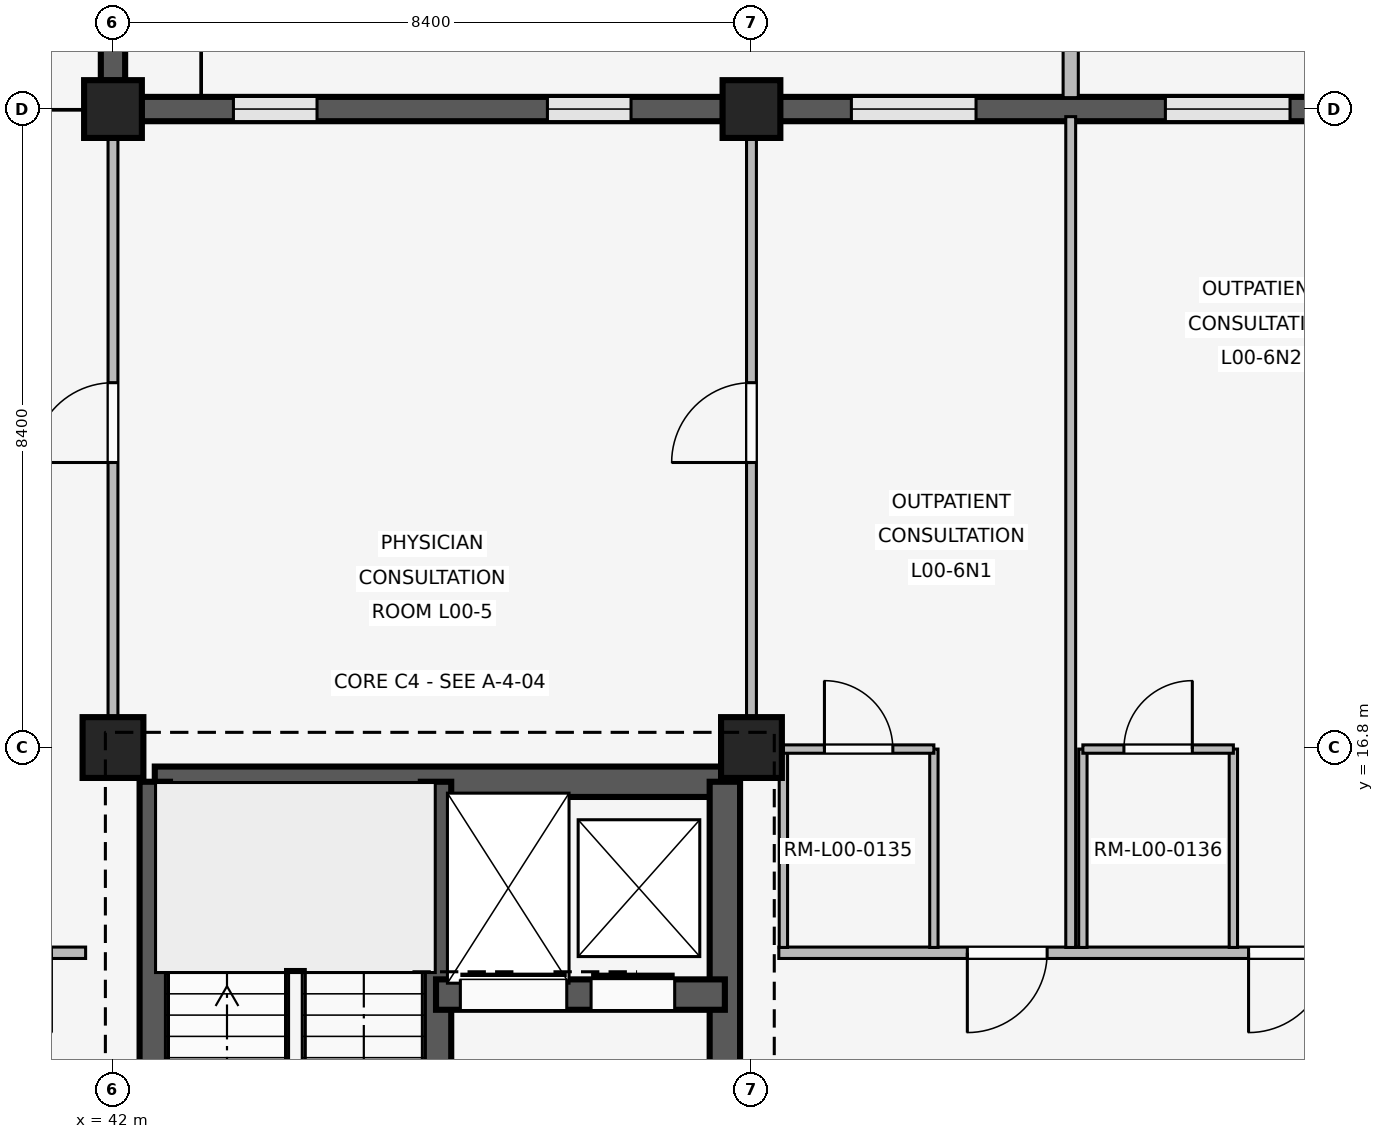
"""IFC4 building model, lengths in metres.
Left out: names, types, materials, properties, quantities, classifications, styles, units other than length and angle.
Written with IfcOpenShell. Run it as: python <this file> out.ifc"""

import sys

from ifc_helpers import new_model, si_unit, direction, frame, frame_2d, origin, origin_2d, place, context, subcontext, project, spatial, rectangle, extrude, element, fill, save


model = new_model("IFC4")
c1 = context("Model", 3, precision=1e-05, world=origin(), true_north=direction((0.0, 1.0)))
c2 = subcontext(c1, "Body", "Model", "MODEL_VIEW")
j1 = project(units=[si_unit("LENGTHUNIT", "METRE"), si_unit("PLANEANGLEUNIT", "RADIAN")], contexts=[c1])
p1 = place(None, origin())
s1 = spatial("IfcSite", under=j1, at=p1, CompositionType="ELEMENT")
p2 = place(p1, origin())
s2 = spatial("IfcBuilding", under=s1, at=p2, CompositionType="ELEMENT")
p3 = place(p2, origin())
s3 = spatial("IfcBuildingStorey", under=s2, at=p3, CompositionType="ELEMENT", Elevation=0.0)
p4 = place(p3, frame((42.0, 16.8, 0.0), z_axis=(0.0, 0.0, 1.0), x_axis=(1.0, 0.0, 0.0)))
e1 = element("IfcColumn", 1, at=p4, inside=s3, PredefinedType="COLUMN", context=c2, shape_type="SweptSolid", body=[
    extrude(rectangle(XDim=0.8, YDim=0.8, at=origin_2d()), origin(), (0.0, 0.0, 1.0), 4.8),
])
p5 = place(p3, frame((42.0, 25.2, 0.0), z_axis=(0.0, 0.0, 1.0), x_axis=(1.0, 0.0, 0.0)))
e2 = element("IfcColumn", 2, at=p5, inside=s3, PredefinedType="COLUMN", context=c2, shape_type="SweptSolid", body=[
    extrude(rectangle(XDim=0.76, YDim=0.76, at=origin_2d()), origin(), (0.0, 0.0, 1.0), 4.8),
])
p6 = place(p3, frame((50.4, 16.8, 0.0), z_axis=(0.0, 0.0, 1.0), x_axis=(1.0, 0.0, 0.0)))
e3 = element("IfcColumn", 3, at=p6, inside=s3, PredefinedType="COLUMN", context=c2, shape_type="SweptSolid", body=[
    extrude(rectangle(XDim=0.8, YDim=0.8, at=origin_2d()), origin(), (0.0, 0.0, 1.0), 4.8),
])
p7 = place(p3, frame((50.4, 25.2, 0.0), z_axis=(0.0, 0.0, 1.0), x_axis=(1.0, 0.0, 0.0)))
e4 = element("IfcColumn", 4, at=p7, inside=s3, PredefinedType="COLUMN", context=c2, shape_type="SweptSolid", body=[
    extrude(rectangle(XDim=0.76, YDim=0.76, at=origin_2d()), origin(), (0.0, 0.0, 1.0), 4.8),
])
p8 = place(p3, frame((42.0, 33.225, 0.0), z_axis=(0.0, 0.0, 1.0), x_axis=(0.0, -1.0, 0.0)))
e5 = element("IfcWall", 5, at=p8, inside=s3, PredefinedType="SOLIDWALL", context=c2, shape_type="SweptSolid", body=[
    extrude(rectangle(XDim=7.65, YDim=0.32, at=frame_2d((3.825, 0.0))), origin(), (0.0, 0.0, 1.0), 3.82),
])
p9 = place(p8, frame((0.969, 0.0, 0.85)))
e6 = element("IfcOpeningElement", 6, at=p9, cuts=e5, PredefinedType="OPENING", context=c2, shape_type="SweptSolid", body=[
    extrude(rectangle(XDim=1.58, YDim=1.7, at=frame_2d((0.79, 0.85))), frame((0.0, 0.17, 0.0), z_axis=(0.0, -1.0, 0.0), x_axis=(1.0, 0.0, 0.0)), (0.0, 0.0, 1.0), 0.34),
])
p10 = place(p8, frame((5.101, 0.0, 0.85)))
e7 = element("IfcOpeningElement", 7, at=p10, cuts=e5, PredefinedType="OPENING", context=c2, shape_type="SweptSolid", body=[
    extrude(rectangle(XDim=1.58, YDim=1.7, at=frame_2d((0.79, 0.85))), frame((0.0, 0.17, 0.0), z_axis=(0.0, -1.0, 0.0), x_axis=(1.0, 0.0, 0.0)), (0.0, 0.0, 1.0), 0.34),
])
p11 = place(p3, frame((42.375, 25.2, 0.0), z_axis=(0.0, 0.0, 1.0), x_axis=(1.0, 0.0, 0.0)))
e8 = element("IfcWall", 8, at=p11, inside=s3, PredefinedType="SOLIDWALL", context=c2, shape_type="SweptSolid", body=[
    extrude(rectangle(XDim=7.65, YDim=0.32, at=frame_2d((3.825, 0.0))), origin(), (0.0, 0.0, 1.0), 3.82),
])
p12 = place(p11, frame((1.209, 0.0, 0.85)))
e9 = element("IfcOpeningElement", 9, at=p12, cuts=e8, PredefinedType="OPENING", context=c2, shape_type="SweptSolid", body=[
    extrude(rectangle(XDim=1.1, YDim=1.6, at=frame_2d((0.55, 0.8))), frame((0.0, 0.17, 0.0), z_axis=(0.0, -1.0, 0.0), x_axis=(1.0, 0.0, 0.0)), (0.0, 0.0, 1.0), 0.34),
])
p13 = place(p11, frame((5.341, 0.0, 0.85)))
e10 = element("IfcOpeningElement", 10, at=p13, cuts=e8, PredefinedType="OPENING", context=c2, shape_type="SweptSolid", body=[
    extrude(rectangle(XDim=1.1, YDim=1.6, at=frame_2d((0.55, 0.8))), frame((0.0, 0.17, 0.0), z_axis=(0.0, -1.0, 0.0), x_axis=(1.0, 0.0, 0.0)), (0.0, 0.0, 1.0), 0.34),
])
p14 = place(p3, frame((50.775, 25.2, 0.0), z_axis=(0.0, 0.0, 1.0), x_axis=(1.0, 0.0, 0.0)))
e11 = element("IfcWall", 11, at=p14, inside=s3, PredefinedType="SOLIDWALL", context=c2, shape_type="SweptSolid", body=[
    extrude(rectangle(XDim=7.65, YDim=0.32, at=frame_2d((3.825, 0.0))), origin(), (0.0, 0.0, 1.0), 3.82),
])
p15 = place(p14, frame((0.939, 0.0, 0.85)))
e12 = element("IfcOpeningElement", 12, at=p15, cuts=e11, PredefinedType="OPENING", context=c2, shape_type="SweptSolid", body=[
    extrude(rectangle(XDim=1.64, YDim=1.75, at=frame_2d((0.82, 0.875))), frame((0.0, 0.17, 0.0), z_axis=(0.0, -1.0, 0.0), x_axis=(1.0, 0.0, 0.0)), (0.0, 0.0, 1.0), 0.34),
])
p16 = place(p14, frame((5.071, 0.0, 0.85)))
e13 = element("IfcOpeningElement", 13, at=p16, cuts=e11, PredefinedType="OPENING", context=c2, shape_type="SweptSolid", body=[
    extrude(rectangle(XDim=1.64, YDim=1.75, at=frame_2d((0.82, 0.875))), frame((0.0, 0.17, 0.0), z_axis=(0.0, -1.0, 0.0), x_axis=(1.0, 0.0, 0.0)), (0.0, 0.0, 1.0), 0.34),
])
p17 = place(p3, frame((54.6, 25.35, 0.0), z_axis=(0.0, 0.0, 1.0), x_axis=(0.0, 1.0, 0.0)))
e14 = element("IfcWall", 14, at=p17, inside=s3, PredefinedType="ELEMENTEDWALL", context=c2, shape_type="SweptSolid", body=[
    extrude(rectangle(XDim=0.85, YDim=0.2, at=frame_2d((0.425, 0.0))), origin(), (0.0, 0.0, 1.0), 3.8),
])
p18 = place(p3, frame((42.55, 16.35, 0.0), z_axis=(0.0, 0.0, 1.0), x_axis=(1.0, 0.0, 0.0)))
e15 = element("IfcWall", 15, at=p18, inside=s3, PredefinedType="SHEAR", context=c2, shape_type="SweptSolid", body=[
    extrude(rectangle(XDim=7.5, YDim=0.4, at=frame_2d((3.75, 0.0))), origin(), (0.0, 0.0, 1.0), 4.52),
])
p19 = place(p3, frame((42.55, 8.8, 0.0), z_axis=(0.0, 0.0, 1.0), x_axis=(0.0, 1.0, 0.0)))
e16 = element("IfcWall", 16, at=p19, inside=s3, PredefinedType="SHEAR", context=c2, shape_type="SweptSolid", body=[
    extrude(rectangle(XDim=7.55, YDim=0.4, at=frame_2d((3.775, 0.0))), origin(), (0.0, 0.0, 1.0), 4.52),
])
p20 = place(p19, frame((0.28, 0.0, 0.0)))
e17 = element("IfcOpeningElement", 17, at=p20, cuts=e16, PredefinedType="OPENING", context=c2, shape_type="SweptSolid", body=[
    extrude(rectangle(XDim=1.0, YDim=2.15, at=frame_2d((0.5, 1.075))), frame((0.0, 0.21, 0.0), z_axis=(0.0, -1.0, 0.0), x_axis=(1.0, 0.0, 0.0)), (0.0, 0.0, 1.0), 0.42),
])
p21 = place(p3, frame((50.05, 8.8, 0.0), z_axis=(0.0, 0.0, 1.0), x_axis=(0.0, 1.0, 0.0)))
e18 = element("IfcWall", 18, at=p21, inside=s3, PredefinedType="SHEAR", context=c2, shape_type="SweptSolid", body=[
    extrude(rectangle(XDim=7.55, YDim=0.4, at=frame_2d((3.775, 0.0))), origin(), (0.0, 0.0, 1.0), 4.52),
])
p22 = place(p21, frame((2.4, 0.0, 0.0)))
e19 = element("IfcOpeningElement", 19, at=p22, cuts=e18, PredefinedType="OPENING", context=c2, shape_type="SweptSolid", body=[
    extrude(rectangle(XDim=1.2, YDim=2.2, at=frame_2d((0.6, 1.1))), frame((0.0, 0.21, 0.0), z_axis=(0.0, -1.0, 0.0), x_axis=(1.0, 0.0, 0.0)), (0.0, 0.0, 1.0), 0.42),
])
p23 = place(p3, frame((46.25, 8.8, 0.0), z_axis=(0.0, 0.0, 1.0), x_axis=(0.0, 1.0, 0.0)))
e20 = element("IfcWall", 20, at=p23, inside=s3, PredefinedType="SHEAR", context=c2, shape_type="SweptSolid", body=[
    extrude(rectangle(XDim=7.55, YDim=0.4, at=frame_2d((3.775, 0.0))), origin(), (0.0, 0.0, 1.0), 4.52),
])
p24 = place(p23, frame((0.28, 0.0, 0.0)))
e21 = element("IfcOpeningElement", 21, at=p24, cuts=e20, PredefinedType="OPENING", context=c2, shape_type="SweptSolid", body=[
    extrude(rectangle(XDim=1.0, YDim=2.15, at=frame_2d((0.5, 1.075))), frame((0.0, 0.21, 0.0), z_axis=(0.0, -1.0, 0.0), x_axis=(1.0, 0.0, 0.0)), (0.0, 0.0, 1.0), 0.42),
])
p25 = place(p3, frame((46.25, 13.55, 0.0), z_axis=(0.0, 0.0, 1.0), x_axis=(1.0, 0.0, 0.0)))
e22 = element("IfcWall", 22, at=p25, inside=s3, PredefinedType="SHEAR", context=c2, shape_type="SweptSolid", body=[
    extrude(rectangle(XDim=3.8, YDim=0.4, at=frame_2d((1.9, 0.0))), origin(), (0.0, 0.0, 1.0), 4.52),
])
p26 = place(p25, frame((0.32, 0.0, 0.0)))
e23 = element("IfcOpeningElement", 23, at=p26, cuts=e22, PredefinedType="OPENING", context=c2, shape_type="SweptSolid", body=[
    extrude(rectangle(XDim=1.4, YDim=2.25, at=frame_2d((0.7, 1.125))), frame((0.0, 0.21, 0.0), z_axis=(0.0, -1.0, 0.0), x_axis=(1.0, 0.0, 0.0)), (0.0, 0.0, 1.0), 0.42),
])
p27 = place(p25, frame((2.04, 0.0, 0.0)))
e24 = element("IfcOpeningElement", 24, at=p27, cuts=e22, PredefinedType="OPENING", context=c2, shape_type="SweptSolid", body=[
    extrude(rectangle(XDim=1.1, YDim=2.15, at=frame_2d((0.55, 1.075))), frame((0.0, 0.21, 0.0), z_axis=(0.0, -1.0, 0.0), x_axis=(1.0, 0.0, 0.0)), (0.0, 0.0, 1.0), 0.42),
])
p28 = place(p3, frame((41.64, 14.1, 0.0), z_axis=(0.0, 0.0, 1.0), x_axis=(-1.0, 0.0, 0.0)))
e25 = element("IfcWall", 25, at=p28, inside=s3, PredefinedType="PARTITIONING", context=c2, shape_type="SweptSolid", body=[
    extrude(rectangle(XDim=7.96, YDim=0.15, at=frame_2d((3.98, 0.0))), origin(), (0.0, 0.0, 1.0), 3.8),
])
p29 = place(p28, frame((0.45, 0.0, 0.0)))
e26 = element("IfcOpeningElement", 26, at=p29, cuts=e25, PredefinedType="OPENING", context=c2, shape_type="SweptSolid", body=[
    extrude(rectangle(XDim=1.05, YDim=2.2, at=frame_2d((0.525, 1.1))), frame((0.0, 0.085, 0.0), z_axis=(0.0, -1.0, 0.0), x_axis=(1.0, 0.0, 0.0)), (0.0, 0.0, 1.0), 0.17),
])
p30 = place(p28, frame((4.15, 0.0, 0.0)))
e27 = element("IfcOpeningElement", 27, at=p30, cuts=e25, PredefinedType="OPENING", context=c2, shape_type="SweptSolid", body=[
    extrude(rectangle(XDim=1.05, YDim=2.2, at=frame_2d((0.525, 1.1))), frame((0.0, 0.085, 0.0), z_axis=(0.0, -1.0, 0.0), x_axis=(1.0, 0.0, 0.0)), (0.0, 0.0, 1.0), 0.17),
])
p31 = place(p3, frame((42.0, 17.15, 0.0), z_axis=(0.0, 0.0, 1.0), x_axis=(0.0, 1.0, 0.0)))
e28 = element("IfcWall", 28, at=p31, inside=s3, PredefinedType="PARTITIONING", context=c2, shape_type="SweptSolid", body=[
    extrude(rectangle(XDim=7.91, YDim=0.13, at=frame_2d((3.955, 0.0))), origin(), (0.0, 0.0, 1.0), 3.8),
])
p32 = place(p31, frame((3.4, 0.0, 0.0)))
e29 = element("IfcOpeningElement", 29, at=p32, cuts=e28, PredefinedType="OPENING", context=c2, shape_type="SweptSolid", body=[
    extrude(rectangle(XDim=1.05, YDim=2.2, at=frame_2d((0.525, 1.1))), frame((0.0, 0.075, 0.0), z_axis=(0.0, -1.0, 0.0), x_axis=(1.0, 0.0, 0.0)), (0.0, 0.0, 1.0), 0.15),
])
p33 = place(p3, frame((50.4, 17.15, 0.0), z_axis=(0.0, 0.0, 1.0), x_axis=(0.0, 1.0, 0.0)))
e30 = element("IfcWall", 30, at=p33, inside=s3, PredefinedType="PARTITIONING", context=c2, shape_type="SweptSolid", body=[
    extrude(rectangle(XDim=7.91, YDim=0.13, at=frame_2d((3.955, 0.0))), origin(), (0.0, 0.0, 1.0), 3.8),
])
p34 = place(p33, frame((3.4, 0.0, 0.0)))
e31 = element("IfcOpeningElement", 31, at=p34, cuts=e30, PredefinedType="OPENING", context=c2, shape_type="SweptSolid", body=[
    extrude(rectangle(XDim=1.05, YDim=2.2, at=frame_2d((0.525, 1.1))), frame((0.0, 0.075, 0.0), z_axis=(0.0, -1.0, 0.0), x_axis=(1.0, 0.0, 0.0)), (0.0, 0.0, 1.0), 0.15),
])
p35 = place(p3, frame((58.72, 14.1, 0.0), z_axis=(0.0, 0.0, 1.0), x_axis=(-1.0, 0.0, 0.0)))
e32 = element("IfcWall", 32, at=p35, inside=s3, PredefinedType="PARTITIONING", context=c2, shape_type="SweptSolid", body=[
    extrude(rectangle(XDim=7.96, YDim=0.15, at=frame_2d((3.98, 0.0))), origin(), (0.0, 0.0, 1.0), 3.8),
])
p36 = place(p35, frame((0.73, 0.0, 0.0)))
e33 = element("IfcOpeningElement", 33, at=p36, cuts=e32, PredefinedType="OPENING", context=c2, shape_type="SweptSolid", body=[
    extrude(rectangle(XDim=1.05, YDim=2.2, at=frame_2d((0.525, 1.1))), frame((0.0, 0.085, 0.0), z_axis=(0.0, -1.0, 0.0), x_axis=(1.0, 0.0, 0.0)), (0.0, 0.0, 1.0), 0.17),
])
p37 = place(p35, frame((4.43, 0.0, 0.0)))
e34 = element("IfcOpeningElement", 34, at=p37, cuts=e32, PredefinedType="OPENING", context=c2, shape_type="SweptSolid", body=[
    extrude(rectangle(XDim=1.05, YDim=2.2, at=frame_2d((0.525, 1.1))), frame((0.0, 0.085, 0.0), z_axis=(0.0, -1.0, 0.0), x_axis=(1.0, 0.0, 0.0)), (0.0, 0.0, 1.0), 0.17),
])
p38 = place(p3, frame((54.6, 14.17, 0.0), z_axis=(0.0, 0.0, 1.0), x_axis=(0.0, 1.0, 0.0)))
e35 = element("IfcWall", 35, at=p38, inside=s3, PredefinedType="PARTITIONING", context=c2, shape_type="SweptSolid", body=[
    extrude(rectangle(XDim=10.93, YDim=0.13, at=frame_2d((5.465, 0.0))), origin(), (0.0, 0.0, 1.0), 3.8),
])
for number, where, z_axis, x_axis in (
    (36, (50.82, 14.17, 0.0), (0.0, 0.0, 1.0), (0.0, 1.0, 0.0)),
    (37, (52.8, 14.17, 0.0), (0.0, 0.0, 1.0), (0.0, 1.0, 0.0)),
):
    element("IfcWall", number, at=place(p3, frame(where, z_axis=z_axis, x_axis=x_axis)), inside=s3, PredefinedType="PARTITIONING", context=c2, shape_type="SweptSolid", body=[
        extrude(rectangle(XDim=2.61, YDim=0.11, at=frame_2d((1.305, 0.0))), origin(), (0.0, 0.0, 1.0), 3.8),
    ])
p39 = place(p3, frame((50.82, 16.78, 0.0), z_axis=(0.0, 0.0, 1.0), x_axis=(1.0, 0.0, 0.0)))
e38 = element("IfcWall", 38, at=p39, inside=s3, PredefinedType="PARTITIONING", context=c2, shape_type="SweptSolid", body=[
    extrude(rectangle(XDim=1.98, YDim=0.11, at=frame_2d((0.99, 0.0))), origin(), (0.0, 0.0, 1.0), 3.8),
])
p40 = place(p39, frame((0.54, 0.0, 0.0)))
e39 = element("IfcOpeningElement", 39, at=p40, cuts=e38, PredefinedType="OPENING", context=c2, shape_type="SweptSolid", body=[
    extrude(rectangle(XDim=0.9, YDim=2.1, at=frame_2d((0.45, 1.05))), frame((0.0, 0.065, 0.0), z_axis=(0.0, -1.0, 0.0), x_axis=(1.0, 0.0, 0.0)), (0.0, 0.0, 1.0), 0.13),
])
for number, where, z_axis, x_axis in (
    (40, (54.76, 14.17, 0.0), (0.0, 0.0, 1.0), (0.0, 1.0, 0.0)),
    (41, (56.74, 14.17, 0.0), (0.0, 0.0, 1.0), (0.0, 1.0, 0.0)),
):
    element("IfcWall", number, at=place(p3, frame(where, z_axis=z_axis, x_axis=x_axis)), inside=s3, PredefinedType="PARTITIONING", context=c2, shape_type="SweptSolid", body=[
        extrude(rectangle(XDim=2.61, YDim=0.11, at=frame_2d((1.305, 0.0))), origin(), (0.0, 0.0, 1.0), 3.8),
    ])
p41 = place(p3, frame((54.76, 16.78, 0.0), z_axis=(0.0, 0.0, 1.0), x_axis=(1.0, 0.0, 0.0)))
e42 = element("IfcWall", 42, at=p41, inside=s3, PredefinedType="PARTITIONING", context=c2, shape_type="SweptSolid", body=[
    extrude(rectangle(XDim=1.98, YDim=0.11, at=frame_2d((0.99, 0.0))), origin(), (0.0, 0.0, 1.0), 3.8),
])
p42 = place(p41, frame((0.54, 0.0, 0.0)))
e43 = element("IfcOpeningElement", 43, at=p42, cuts=e42, PredefinedType="OPENING", context=c2, shape_type="SweptSolid", body=[
    extrude(rectangle(XDim=0.9, YDim=2.1, at=frame_2d((0.45, 1.05))), frame((0.0, 0.065, 0.0), z_axis=(0.0, -1.0, 0.0), x_axis=(1.0, 0.0, 0.0)), (0.0, 0.0, 1.0), 0.13),
])
p43 = place(p12, origin())
e44 = element("IfcWindow", 44, at=p43, inside=s3, PartitioningType="SINGLE_PANEL", PredefinedType="WINDOW", context=c2, shape_type="SweptSolid", body=[
    extrude(rectangle(XDim=1.1, YDim=1.6, at=frame_2d((0.55, 0.8))), frame((0.0, 0.03, 0.0), z_axis=(0.0, -1.0, 0.0), x_axis=(1.0, 0.0, 0.0)), (0.0, 0.0, 1.0), 0.06),
])
fill(e9, e44)
p44 = place(p13, origin())
e45 = element("IfcWindow", 45, at=p44, inside=s3, PartitioningType="SINGLE_PANEL", PredefinedType="WINDOW", context=c2, shape_type="SweptSolid", body=[
    extrude(rectangle(XDim=1.1, YDim=1.6, at=frame_2d((0.55, 0.8))), frame((0.0, 0.03, 0.0), z_axis=(0.0, -1.0, 0.0), x_axis=(1.0, 0.0, 0.0)), (0.0, 0.0, 1.0), 0.06),
])
fill(e10, e45)
p45 = place(p15, origin())
e46 = element("IfcWindow", 46, at=p45, inside=s3, PartitioningType="SINGLE_PANEL", PredefinedType="WINDOW", context=c2, shape_type="SweptSolid", body=[
    extrude(rectangle(XDim=1.64, YDim=1.75, at=frame_2d((0.82, 0.875))), frame((0.0, 0.03, 0.0), z_axis=(0.0, -1.0, 0.0), x_axis=(1.0, 0.0, 0.0)), (0.0, 0.0, 1.0), 0.06),
])
fill(e12, e46)
p46 = place(p16, origin())
e47 = element("IfcWindow", 47, at=p46, inside=s3, PartitioningType="SINGLE_PANEL", PredefinedType="WINDOW", context=c2, shape_type="SweptSolid", body=[
    extrude(rectangle(XDim=1.64, YDim=1.75, at=frame_2d((0.82, 0.875))), frame((0.0, 0.03, 0.0), z_axis=(0.0, -1.0, 0.0), x_axis=(1.0, 0.0, 0.0)), (0.0, 0.0, 1.0), 0.06),
])
fill(e13, e47)
p47 = place(p26, origin())
e48 = element("IfcDoor", 48, at=p47, inside=s3, OperationType="SLIDING_TO_LEFT", PredefinedType="DOOR", context=c2, shape_type="SweptSolid", body=[
    extrude(rectangle(XDim=1.4, YDim=2.25, at=frame_2d((0.7, 1.125))), frame((0.0, 0.025, 0.0), z_axis=(0.0, -1.0, 0.0), x_axis=(1.0, 0.0, 0.0)), (0.0, 0.0, 1.0), 0.05),
])
fill(e23, e48)
p48 = place(p27, origin())
e49 = element("IfcDoor", 49, at=p48, inside=s3, OperationType="SLIDING_TO_LEFT", PredefinedType="DOOR", context=c2, shape_type="SweptSolid", body=[
    extrude(rectangle(XDim=1.1, YDim=2.15, at=frame_2d((0.55, 1.075))), frame((0.0, 0.025, 0.0), z_axis=(0.0, -1.0, 0.0), x_axis=(1.0, 0.0, 0.0)), (0.0, 0.0, 1.0), 0.05),
])
fill(e24, e49)
p49 = place(p32, origin())
e50 = element("IfcDoor", 50, at=p49, inside=s3, OperationType="SINGLE_SWING_LEFT", PredefinedType="DOOR", context=c2, shape_type="SweptSolid", body=[
    extrude(rectangle(XDim=1.05, YDim=2.2, at=frame_2d((0.525, 1.1))), frame((0.0, 0.025, 0.0), z_axis=(0.0, -1.0, 0.0), x_axis=(1.0, 0.0, 0.0)), (0.0, 0.0, 1.0), 0.05),
])
fill(e29, e50)
p50 = place(p34, origin())
e51 = element("IfcDoor", 51, at=p50, inside=s3, OperationType="SINGLE_SWING_LEFT", PredefinedType="DOOR", context=c2, shape_type="SweptSolid", body=[
    extrude(rectangle(XDim=1.05, YDim=2.2, at=frame_2d((0.525, 1.1))), frame((0.0, 0.025, 0.0), z_axis=(0.0, -1.0, 0.0), x_axis=(1.0, 0.0, 0.0)), (0.0, 0.0, 1.0), 0.05),
])
fill(e31, e51)
p51 = place(p36, origin())
e52 = element("IfcDoor", 52, at=p51, inside=s3, OperationType="SINGLE_SWING_RIGHT", PredefinedType="DOOR", context=c2, shape_type="SweptSolid", body=[
    extrude(rectangle(XDim=1.05, YDim=2.2, at=frame_2d((0.525, 1.1))), frame((0.0, 0.025, 0.0), z_axis=(0.0, -1.0, 0.0), x_axis=(1.0, 0.0, 0.0)), (0.0, 0.0, 1.0), 0.05),
])
fill(e33, e52)
p52 = place(p37, origin())
e53 = element("IfcDoor", 53, at=p52, inside=s3, OperationType="SINGLE_SWING_RIGHT", PredefinedType="DOOR", context=c2, shape_type="SweptSolid", body=[
    extrude(rectangle(XDim=1.05, YDim=2.2, at=frame_2d((0.525, 1.1))), frame((0.0, 0.025, 0.0), z_axis=(0.0, -1.0, 0.0), x_axis=(1.0, 0.0, 0.0)), (0.0, 0.0, 1.0), 0.05),
])
fill(e34, e53)
p53 = place(p40, origin())
e54 = element("IfcDoor", 54, at=p53, inside=s3, OperationType="SINGLE_SWING_LEFT", PredefinedType="DOOR", context=c2, shape_type="SweptSolid", body=[
    extrude(rectangle(XDim=0.9, YDim=2.1, at=frame_2d((0.45, 1.05))), frame((0.0, 0.025, 0.0), z_axis=(0.0, -1.0, 0.0), x_axis=(1.0, 0.0, 0.0)), (0.0, 0.0, 1.0), 0.05),
])
fill(e39, e54)
p54 = place(p42, origin())
e55 = element("IfcDoor", 55, at=p54, inside=s3, OperationType="SINGLE_SWING_RIGHT", PredefinedType="DOOR", context=c2, shape_type="SweptSolid", body=[
    extrude(rectangle(XDim=0.9, YDim=2.1, at=frame_2d((0.45, 1.05))), frame((0.0, 0.025, 0.0), z_axis=(0.0, -1.0, 0.0), x_axis=(1.0, 0.0, 0.0)), (0.0, 0.0, 1.0), 0.05),
])
fill(e43, e55)
save(model, sys.argv[1])
